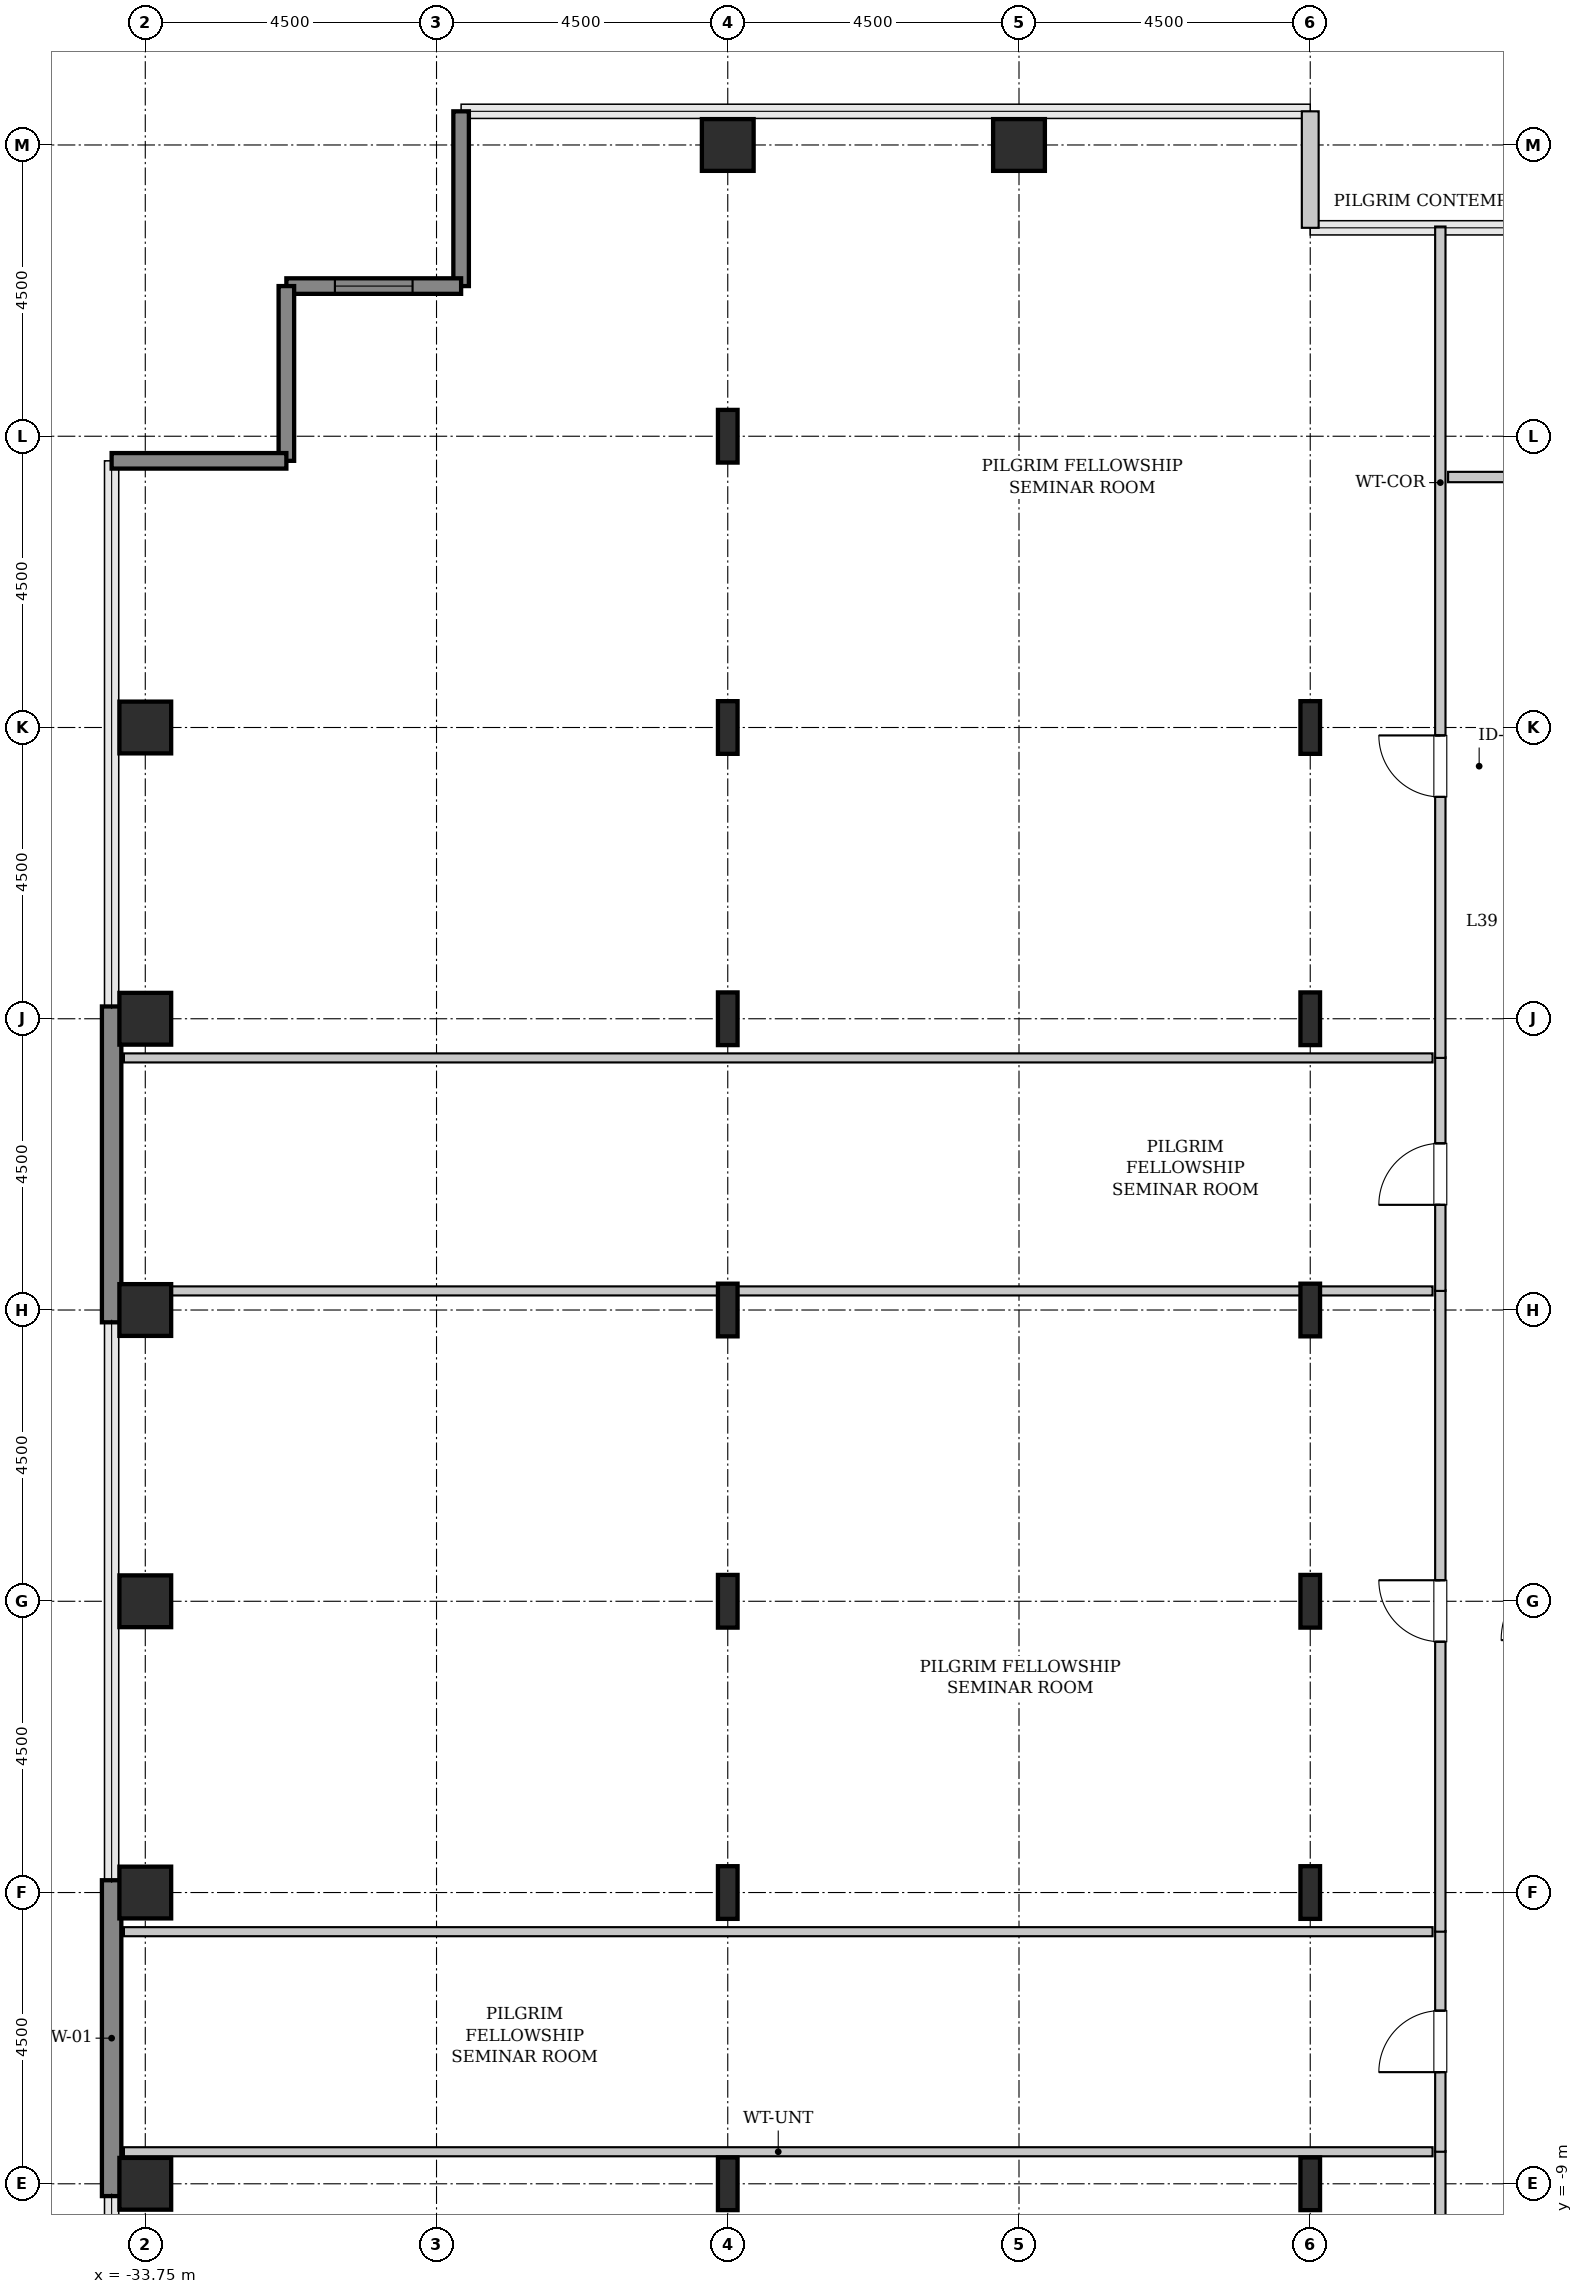
"""IFC4 building model, lengths in metres.
Left out: names, types, materials, properties, quantities, classifications, styles, units other than length and angle.
Written with IfcOpenShell. Run it as: python <this file> out.ifc"""

import sys

from ifc_helpers import new_model, si_unit, direction, frame, frame_2d, origin, origin_2d, place, context, subcontext, project, spatial, rectangle, hollow_rectangle, i_section, extrude, source, transform, mapped, element, fill, save


model = new_model("IFC4")
c1 = context("Model", 3, precision=1e-05, world=origin(), true_north=direction((0.0, 1.0)))
c2 = subcontext(c1, "Body", "Model", "MODEL_VIEW")
j1 = project(units=[si_unit("LENGTHUNIT", "METRE"), si_unit("PLANEANGLEUNIT", "RADIAN")], contexts=[c1])
p1 = place(None, origin())
s1 = spatial("IfcSite", under=j1, at=p1, CompositionType="ELEMENT")
p2 = place(p1, origin())
s2 = spatial("IfcBuilding", under=s1, at=p2, CompositionType="ELEMENT")
p3 = place(p2, frame((0.0, 0.0, 160.2)))
s3 = spatial("IfcBuildingStorey", under=s2, at=p3, CompositionType="ELEMENT", Elevation=160.2)
m1 = source(origin(), c2, "Body", "SweptSolid", [
    extrude(hollow_rectangle(XDim=0.8, YDim=0.8, WallThickness=0.04, InnerFilletRadius=0.04, OuterFilletRadius=0.08, at=origin_2d()), origin(), (0.0, 0.0, 1.0), 3.8),
])
for number, where, z_axis, x_axis in (
    (1, (-33.75, -9.0, 0.0), (0.0, 0.0, 1.0), (1.0, 0.0, 0.0)),
    (2, (-33.75, -4.5, 0.0), (0.0, 0.0, 1.0), (1.0, 0.0, 0.0)),
    (3, (-33.75, 0.0, 0.0), (0.0, 0.0, 1.0), (1.0, 0.0, 0.0)),
    (4, (-33.75, 4.5, 0.0), (0.0, 0.0, 1.0), (1.0, 0.0, 0.0)),
    (5, (-33.75, 9.0, 0.0), (0.0, 0.0, 1.0), (1.0, 0.0, 0.0)),
    (6, (-33.75, 13.5, 0.0), (0.0, 0.0, 1.0), (1.0, 0.0, 0.0)),
):
    element("IfcColumn", number, at=place(p3, frame(where, z_axis=z_axis, x_axis=x_axis)), inside=s3, PredefinedType="COLUMN", context=c2, shape_type="MappedRepresentation", body=[
        mapped(m1, transform((0.0, 0.0, 0.0), x_axis=(1.0, 0.0, 0.0), y_axis=(0.0, 1.0, 0.0), z_axis=(0.0, 0.0, 1.0), scale=1.0)),
    ])
m2 = source(origin(), c2, "Body", "SweptSolid", [
    extrude(i_section(OverallWidth=0.303, OverallDepth=0.814, WebThickness=0.021, FlangeThickness=0.04, FilletRadius=0.03, at=origin_2d()), origin(), (0.0, 0.0, 1.0), 3.8),
])
for number, where, z_axis, x_axis in (
    (7, (-24.75, -9.0, 0.0), (0.0, 0.0, 1.0), (1.0, 0.0, 0.0)),
    (8, (-24.75, -4.5, 0.0), (0.0, 0.0, 1.0), (1.0, 0.0, 0.0)),
    (9, (-24.75, 0.0, 0.0), (0.0, 0.0, 1.0), (1.0, 0.0, 0.0)),
    (10, (-24.75, 4.5, 0.0), (0.0, 0.0, 1.0), (1.0, 0.0, 0.0)),
    (11, (-24.75, 9.0, 0.0), (0.0, 0.0, 1.0), (1.0, 0.0, 0.0)),
    (12, (-24.75, 13.5, 0.0), (0.0, 0.0, 1.0), (1.0, 0.0, 0.0)),
    (13, (-24.75, 18.0, 0.0), (0.0, 0.0, 1.0), (1.0, 0.0, 0.0)),
):
    element("IfcColumn", number, at=place(p3, frame(where, z_axis=z_axis, x_axis=x_axis)), inside=s3, PredefinedType="COLUMN", context=c2, shape_type="MappedRepresentation", body=[
        mapped(m2, transform((0.0, 0.0, 0.0), x_axis=(1.0, 0.0, 0.0), y_axis=(0.0, 1.0, 0.0), z_axis=(0.0, 0.0, 1.0), scale=1.0)),
    ])
for number, where, z_axis, x_axis in (
    (14, (-24.75, 22.5, 0.0), (0.0, 0.0, 1.0), (1.0, 0.0, 0.0)),
    (15, (-20.25, 22.5, 0.0), (0.0, 0.0, 1.0), (1.0, 0.0, 0.0)),
):
    element("IfcColumn", number, at=place(p3, frame(where, z_axis=z_axis, x_axis=x_axis)), inside=s3, PredefinedType="COLUMN", context=c2, shape_type="MappedRepresentation", body=[
        mapped(m1, transform((0.0, 0.0, 0.0), x_axis=(1.0, 0.0, 0.0), y_axis=(0.0, 1.0, 0.0), z_axis=(0.0, 0.0, 1.0), scale=1.0)),
    ])
for number, where, z_axis, x_axis in (
    (16, (-15.75, -9.0, 0.0), (0.0, 0.0, 1.0), (1.0, 0.0, 0.0)),
    (17, (-15.75, -4.5, 0.0), (0.0, 0.0, 1.0), (1.0, 0.0, 0.0)),
    (18, (-15.75, 0.0, 0.0), (0.0, 0.0, 1.0), (1.0, 0.0, 0.0)),
    (19, (-15.75, 4.5, 0.0), (0.0, 0.0, 1.0), (1.0, 0.0, 0.0)),
    (20, (-15.75, 9.0, 0.0), (0.0, 0.0, 1.0), (1.0, 0.0, 0.0)),
    (21, (-15.75, 13.5, 0.0), (0.0, 0.0, 1.0), (1.0, 0.0, 0.0)),
):
    element("IfcColumn", number, at=place(p3, frame(where, z_axis=z_axis, x_axis=x_axis)), inside=s3, PredefinedType="COLUMN", context=c2, shape_type="MappedRepresentation", body=[
        mapped(m2, transform((0.0, 0.0, 0.0), x_axis=(1.0, 0.0, 0.0), y_axis=(0.0, 1.0, 0.0), z_axis=(0.0, 0.0, 1.0), scale=1.0)),
    ])
m3 = source(origin(), c2, "Body", "SweptSolid", [
    extrude(rectangle(XDim=4.88, YDim=0.3, at=frame_2d((2.44, 0.0))), origin(), (0.0, 0.0, 1.0), 3.55),
])
for number, where, z_axis, x_axis in (
    (22, (-34.27, -9.19, 0.0), (0.0, 0.0, 1.0), (0.0, 1.0, 0.0)),
    (23, (-34.27, 4.31, 0.0), (0.0, 0.0, 1.0), (0.0, 1.0, 0.0)),
):
    element("IfcWall", number, at=place(p3, frame(where, z_axis=z_axis, x_axis=x_axis)), inside=s3, PredefinedType="SHEAR", context=c2, shape_type="MappedRepresentation", body=[
        mapped(m3, transform((0.0, 0.0, 0.0), x_axis=(1.0, 0.0, 0.0), y_axis=(0.0, 1.0, 0.0), z_axis=(0.0, 0.0, 1.0), scale=1.0)),
    ])
m4 = source(origin(), c2, "Body", "SweptSolid", [
    extrude(rectangle(XDim=1.8, YDim=0.26, at=frame_2d((0.9, 0.0))), origin(), (0.0, 0.0, 1.0), 3.55),
])
p4 = place(p3, frame((-15.75, 21.22, 0.0), z_axis=(0.0, 0.0, 1.0), x_axis=(0.0, 1.0, 0.0)))
e24 = element("IfcWall", 24, at=p4, inside=s3, PredefinedType="SOLIDWALL", context=c2, shape_type="MappedRepresentation", body=[
    mapped(m4, transform((0.0, 0.0, 0.0), x_axis=(1.0, 0.0, 0.0), y_axis=(0.0, 1.0, 0.0), z_axis=(0.0, 0.0, 1.0), scale=1.0)),
])
m5 = source(origin(), c2, "Body", "SweptSolid", [
    extrude(rectangle(XDim=2.7, YDim=0.24, at=frame_2d((1.35, 0.0))), origin(), (0.0, 0.0, 1.0), 3.55),
])
p5 = place(p3, frame((-28.87, 23.02, 0.0), z_axis=(0.0, 0.0, 1.0), x_axis=(0.0, -1.0, 0.0)))
e25 = element("IfcWall", 25, at=p5, inside=s3, PredefinedType="SHEAR", context=c2, shape_type="MappedRepresentation", body=[
    mapped(m5, transform((0.0, 0.0, 0.0), x_axis=(1.0, 0.0, 0.0), y_axis=(0.0, 1.0, 0.0), z_axis=(0.0, 0.0, 1.0), scale=1.0)),
])
p6 = place(p3, frame((-28.87, 20.32, 0.0), z_axis=(0.0, 0.0, 1.0), x_axis=(-1.0, 0.0, 0.0)))
e26 = element("IfcWall", 26, at=p6, inside=s3, PredefinedType="SHEAR", context=c2, shape_type="MappedRepresentation", body=[
    mapped(m5, transform((0.0, 0.0, 0.0), x_axis=(1.0, 0.0, 0.0), y_axis=(0.0, 1.0, 0.0), z_axis=(0.0, 0.0, 1.0), scale=1.0)),
])
p7 = place(p6, frame((0.75, 0.0, 0.85)))
e27 = element("IfcOpeningElement", 27, at=p7, cuts=e26, PredefinedType="OPENING", context=c2, shape_type="SweptSolid", body=[
    extrude(rectangle(XDim=1.2, YDim=1.8, at=frame_2d((0.6, 0.9))), frame((0.0, 0.13, 0.0), z_axis=(0.0, -1.0, 0.0), x_axis=(1.0, 0.0, 0.0)), (0.0, 0.0, 1.0), 0.26),
])
for number, where, z_axis, x_axis in (
    (28, (-31.57, 20.32, 0.0), (0.0, 0.0, 1.0), (0.0, -1.0, 0.0)),
    (29, (-31.57, 17.62, 0.0), (0.0, 0.0, 1.0), (-1.0, 0.0, 0.0)),
):
    element("IfcWall", number, at=place(p3, frame(where, z_axis=z_axis, x_axis=x_axis)), inside=s3, PredefinedType="SHEAR", context=c2, shape_type="MappedRepresentation", body=[
        mapped(m5, transform((0.0, 0.0, 0.0), x_axis=(1.0, 0.0, 0.0), y_axis=(0.0, 1.0, 0.0), z_axis=(0.0, 0.0, 1.0), scale=1.0)),
    ])
m6 = source(origin(), c2, "Body", "SweptSolid", [
    extrude(rectangle(XDim=12.745, YDim=0.16, at=frame_2d((6.373, 0.0))), origin(), (0.0, 0.0, 1.0), 3.535),
])
p8 = place(p3, frame((-13.74, -21.24, 0.0), z_axis=(0.0, 0.0, 1.0), x_axis=(0.0, 1.0, 0.0)))
e30 = element("IfcWall", 30, at=p8, inside=s3, PredefinedType="PARTITIONING", context=c2, shape_type="MappedRepresentation", body=[
    mapped(m6, transform((0.0, 0.0, 0.0), x_axis=(1.0, 0.0, 0.0), y_axis=(0.0, 1.0, 0.0), z_axis=(0.0, 0.0, 1.0), scale=1.0)),
])
p9 = place(p8, frame((7.812, 0.0, 0.0)))
e31 = element("IfcOpeningElement", 31, at=p9, cuts=e30, PredefinedType="OPENING", context=c2, shape_type="SweptSolid", body=[
    extrude(rectangle(XDim=0.95, YDim=2.1, at=frame_2d((0.475, 1.05))), frame((0.0, 0.09, 0.0), z_axis=(0.0, -1.0, 0.0), x_axis=(1.0, 0.0, 0.0)), (0.0, 0.0, 1.0), 0.18),
])
m7 = source(origin(), c2, "Body", "SweptSolid", [
    extrude(rectangle(XDim=20.22, YDim=0.14, at=frame_2d((10.11, 0.0))), origin(), (0.0, 0.0, 1.0), 2.875),
])
p10 = place(p3, frame((-34.08, -8.505, 0.0), z_axis=(0.0, 0.0, 1.0), x_axis=(1.0, 0.0, 0.0)))
e32 = element("IfcWall", 32, at=p10, inside=s3, PredefinedType="PARTITIONING", context=c2, shape_type="MappedRepresentation", body=[
    mapped(m7, transform((0.0, 0.0, 0.0), x_axis=(1.0, 0.0, 0.0), y_axis=(0.0, 1.0, 0.0), z_axis=(0.0, 0.0, 1.0), scale=1.0)),
])
m8 = source(origin(), c2, "Body", "SweptSolid", [
    extrude(rectangle(XDim=3.41, YDim=0.16, at=frame_2d((1.705, 0.0))), origin(), (0.0, 0.0, 1.0), 3.535),
])
p11 = place(p3, frame((-13.74, -8.505, 0.0), z_axis=(0.0, 0.0, 1.0), x_axis=(0.0, 1.0, 0.0)))
e33 = element("IfcWall", 33, at=p11, inside=s3, PredefinedType="PARTITIONING", context=c2, shape_type="MappedRepresentation", body=[
    mapped(m8, transform((0.0, 0.0, 0.0), x_axis=(1.0, 0.0, 0.0), y_axis=(0.0, 1.0, 0.0), z_axis=(0.0, 0.0, 1.0), scale=1.0)),
])
p12 = place(p11, frame((1.23, 0.0, 0.0)))
e34 = element("IfcOpeningElement", 34, at=p12, cuts=e33, PredefinedType="OPENING", context=c2, shape_type="SweptSolid", body=[
    extrude(rectangle(XDim=0.95, YDim=2.1, at=frame_2d((0.475, 1.05))), frame((0.0, 0.09, 0.0), z_axis=(0.0, -1.0, 0.0), x_axis=(1.0, 0.0, 0.0)), (0.0, 0.0, 1.0), 0.18),
])
m9 = source(origin(), c2, "Body", "SweptSolid", [
    extrude(rectangle(XDim=20.22, YDim=0.14, at=frame_2d((10.11, 0.0))), origin(), (0.0, 0.0, 1.0), 3.535),
])
p13 = place(p3, frame((-34.08, -5.105, 0.0), z_axis=(0.0, 0.0, 1.0), x_axis=(1.0, 0.0, 0.0)))
e35 = element("IfcWall", 35, at=p13, inside=s3, PredefinedType="PARTITIONING", context=c2, shape_type="MappedRepresentation", body=[
    mapped(m9, transform((0.0, 0.0, 0.0), x_axis=(1.0, 0.0, 0.0), y_axis=(0.0, 1.0, 0.0), z_axis=(0.0, 0.0, 1.0), scale=1.0)),
])
m10 = source(origin(), c2, "Body", "SweptSolid", [
    extrude(rectangle(XDim=9.91, YDim=0.16, at=frame_2d((4.955, 0.0))), origin(), (0.0, 0.0, 1.0), 3.535),
])
p14 = place(p3, frame((-13.74, -5.105, 0.0), z_axis=(0.0, 0.0, 1.0), x_axis=(0.0, 1.0, 0.0)))
e36 = element("IfcWall", 36, at=p14, inside=s3, PredefinedType="PARTITIONING", context=c2, shape_type="MappedRepresentation", body=[
    mapped(m10, transform((0.0, 0.0, 0.0), x_axis=(1.0, 0.0, 0.0), y_axis=(0.0, 1.0, 0.0), z_axis=(0.0, 0.0, 1.0), scale=1.0)),
])
p15 = place(p14, frame((4.48, 0.0, 0.0)))
e37 = element("IfcOpeningElement", 37, at=p15, cuts=e36, PredefinedType="OPENING", context=c2, shape_type="SweptSolid", body=[
    extrude(rectangle(XDim=0.95, YDim=2.1, at=frame_2d((0.475, 1.05))), frame((0.0, 0.09, 0.0), z_axis=(0.0, -1.0, 0.0), x_axis=(1.0, 0.0, 0.0)), (0.0, 0.0, 1.0), 0.18),
])
p16 = place(p3, frame((-34.08, 4.795, 0.0), z_axis=(0.0, 0.0, 1.0), x_axis=(1.0, 0.0, 0.0)))
e38 = element("IfcWall", 38, at=p16, inside=s3, PredefinedType="PARTITIONING", context=c2, shape_type="MappedRepresentation", body=[
    mapped(m7, transform((0.0, 0.0, 0.0), x_axis=(1.0, 0.0, 0.0), y_axis=(0.0, 1.0, 0.0), z_axis=(0.0, 0.0, 1.0), scale=1.0)),
])
m11 = source(origin(), c2, "Body", "SweptSolid", [
    extrude(rectangle(XDim=3.61, YDim=0.16, at=frame_2d((1.805, 0.0))), origin(), (0.0, 0.0, 1.0), 3.535),
])
p17 = place(p3, frame((-13.74, 4.795, 0.0), z_axis=(0.0, 0.0, 1.0), x_axis=(0.0, 1.0, 0.0)))
e39 = element("IfcWall", 39, at=p17, inside=s3, PredefinedType="PARTITIONING", context=c2, shape_type="MappedRepresentation", body=[
    mapped(m11, transform((0.0, 0.0, 0.0), x_axis=(1.0, 0.0, 0.0), y_axis=(0.0, 1.0, 0.0), z_axis=(0.0, 0.0, 1.0), scale=1.0)),
])
p18 = place(p17, frame((1.33, 0.0, 0.0)))
e40 = element("IfcOpeningElement", 40, at=p18, cuts=e39, PredefinedType="OPENING", context=c2, shape_type="SweptSolid", body=[
    extrude(rectangle(XDim=0.95, YDim=2.1, at=frame_2d((0.475, 1.05))), frame((0.0, 0.09, 0.0), z_axis=(0.0, -1.0, 0.0), x_axis=(1.0, 0.0, 0.0)), (0.0, 0.0, 1.0), 0.18),
])
p19 = place(p3, frame((-34.08, 8.395, 0.0), z_axis=(0.0, 0.0, 1.0), x_axis=(1.0, 0.0, 0.0)))
e41 = element("IfcWall", 41, at=p19, inside=s3, PredefinedType="PARTITIONING", context=c2, shape_type="MappedRepresentation", body=[
    mapped(m9, transform((0.0, 0.0, 0.0), x_axis=(1.0, 0.0, 0.0), y_axis=(0.0, 1.0, 0.0), z_axis=(0.0, 0.0, 1.0), scale=1.0)),
])
m12 = source(origin(), c2, "Body", "SweptSolid", [
    extrude(rectangle(XDim=12.845, YDim=0.16, at=frame_2d((6.422, 0.0))), origin(), (0.0, 0.0, 1.0), 3.535),
])
p20 = place(p3, frame((-13.74, 8.395, 0.0), z_axis=(0.0, 0.0, 1.0), x_axis=(0.0, 1.0, 0.0)))
e42 = element("IfcWall", 42, at=p20, inside=s3, PredefinedType="PARTITIONING", context=c2, shape_type="MappedRepresentation", body=[
    mapped(m12, transform((0.0, 0.0, 0.0), x_axis=(1.0, 0.0, 0.0), y_axis=(0.0, 1.0, 0.0), z_axis=(0.0, 0.0, 1.0), scale=1.0)),
])
p21 = place(p20, frame((4.032, 0.0, 0.0)))
e43 = element("IfcOpeningElement", 43, at=p21, cuts=e42, PredefinedType="OPENING", context=c2, shape_type="SweptSolid", body=[
    extrude(rectangle(XDim=0.95, YDim=2.1, at=frame_2d((0.475, 1.05))), frame((0.0, 0.09, 0.0), z_axis=(0.0, -1.0, 0.0), x_axis=(1.0, 0.0, 0.0)), (0.0, 0.0, 1.0), 0.18),
])
m13 = source(origin(), c2, "Body", "SweptSolid", [
    extrude(rectangle(XDim=4.16, YDim=0.16, at=frame_2d((2.08, 0.0))), origin(), (0.0, 0.0, 1.0), 3.535),
])
p22 = place(p3, frame((-13.62, 17.37, 0.0), z_axis=(0.0, 0.0, 1.0), x_axis=(1.0, 0.0, 0.0)))
e44 = element("IfcWall", 44, at=p22, inside=s3, PredefinedType="PARTITIONING", context=c2, shape_type="MappedRepresentation", body=[
    mapped(m13, transform((0.0, 0.0, 0.0), x_axis=(1.0, 0.0, 0.0), y_axis=(0.0, 1.0, 0.0), z_axis=(0.0, 0.0, 1.0), scale=1.0)),
])
p23 = place(p22, frame((0.969, 0.0, 0.0)))
e45 = element("IfcOpeningElement", 45, at=p23, cuts=e44, PredefinedType="OPENING", context=c2, shape_type="SweptSolid", body=[
    extrude(rectangle(XDim=0.95, YDim=2.1, at=frame_2d((0.475, 1.05))), frame((0.0, 0.09, 0.0), z_axis=(0.0, -1.0, 0.0), x_axis=(1.0, 0.0, 0.0)), (0.0, 0.0, 1.0), 0.18),
])
m14 = source(origin(), c2, "Body", "SweptSolid", [
    extrude(rectangle(XDim=1.2, YDim=1.8, at=frame_2d((0.6, 0.9))), frame((0.0, 0.03, 0.0), z_axis=(0.0, -1.0, 0.0), x_axis=(1.0, 0.0, 0.0)), (0.0, 0.0, 1.0), 0.06),
])
p24 = place(p7, origin())
e46 = element("IfcWindow", 46, at=p24, inside=s3, PartitioningType="SINGLE_PANEL", PredefinedType="WINDOW", context=c2, shape_type="MappedRepresentation", body=[
    mapped(m14, transform((0.0, 0.0, 0.0), x_axis=(1.0, 0.0, 0.0), y_axis=(0.0, 1.0, 0.0), z_axis=(0.0, 0.0, 1.0), scale=1.0)),
])
fill(e27, e46)
m15 = source(origin(), c2, "Body", "SweptSolid", [
    extrude(rectangle(XDim=0.95, YDim=2.1, at=frame_2d((0.475, 1.05))), frame((0.0, 0.025, 0.0), z_axis=(0.0, -1.0, 0.0), x_axis=(1.0, 0.0, 0.0)), (0.0, 0.0, 1.0), 0.05),
])
p25 = place(p12, origin())
e47 = element("IfcDoor", 47, at=p25, inside=s3, OperationType="SINGLE_SWING_LEFT", PredefinedType="DOOR", context=c2, shape_type="MappedRepresentation", body=[
    mapped(m15, transform((0.0, 0.0, 0.0), x_axis=(1.0, 0.0, 0.0), y_axis=(0.0, 1.0, 0.0), z_axis=(0.0, 0.0, 1.0), scale=1.0)),
])
fill(e34, e47)
p26 = place(p15, origin())
e48 = element("IfcDoor", 48, at=p26, inside=s3, OperationType="SINGLE_SWING_RIGHT", PredefinedType="DOOR", context=c2, shape_type="MappedRepresentation", body=[
    mapped(m15, transform((0.0, 0.0, 0.0), x_axis=(1.0, 0.0, 0.0), y_axis=(0.0, 1.0, 0.0), z_axis=(0.0, 0.0, 1.0), scale=1.0)),
])
fill(e37, e48)
p27 = place(p18, origin())
e49 = element("IfcDoor", 49, at=p27, inside=s3, OperationType="SINGLE_SWING_LEFT", PredefinedType="DOOR", context=c2, shape_type="MappedRepresentation", body=[
    mapped(m15, transform((0.0, 0.0, 0.0), x_axis=(1.0, 0.0, 0.0), y_axis=(0.0, 1.0, 0.0), z_axis=(0.0, 0.0, 1.0), scale=1.0)),
])
fill(e40, e49)
p28 = place(p21, origin())
e50 = element("IfcDoor", 50, at=p28, inside=s3, OperationType="SINGLE_SWING_RIGHT", PredefinedType="DOOR", context=c2, shape_type="MappedRepresentation", body=[
    mapped(m15, transform((0.0, 0.0, 0.0), x_axis=(1.0, 0.0, 0.0), y_axis=(0.0, 1.0, 0.0), z_axis=(0.0, 0.0, 1.0), scale=1.0)),
])
fill(e43, e50)
save(model, sys.argv[1])
